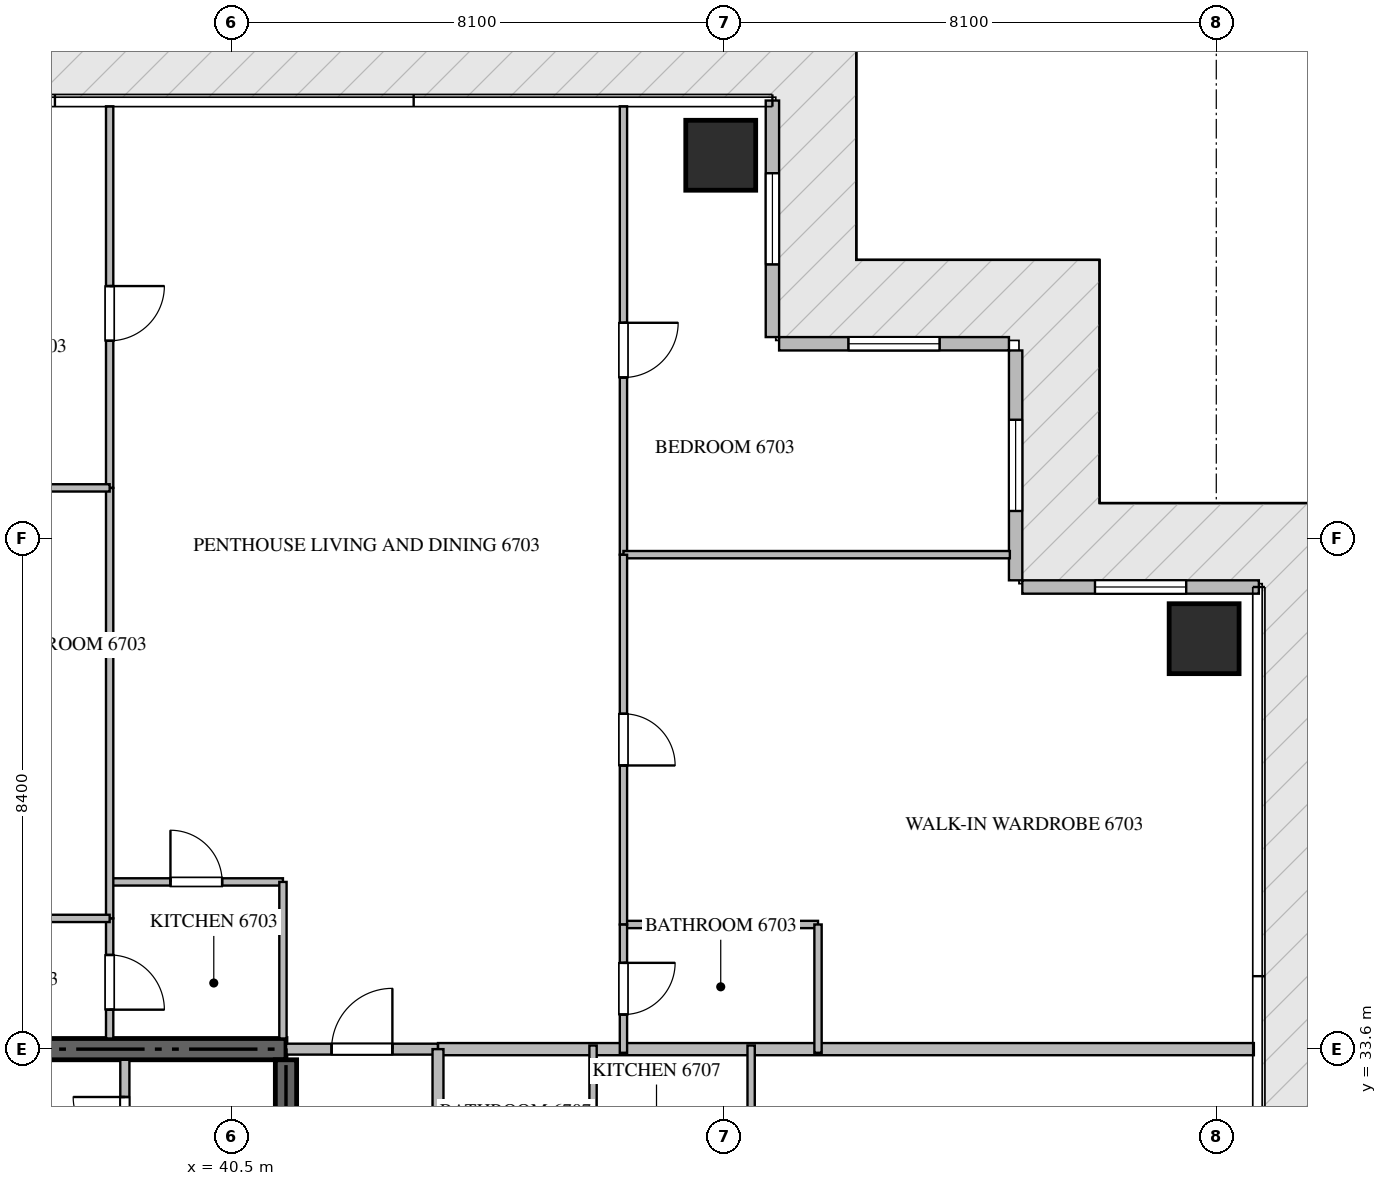
"""IFC4 building model, lengths in metres.
Left out: names, types, materials, properties, quantities, classifications, styles, units other than length and angle.
Written with IfcOpenShell. Run it as: python <this file> out.ifc"""

import sys

from ifc_helpers import new_model, si_unit, direction, frame, frame_2d, origin, origin_2d, place, context, subcontext, project, spatial, rectangle, extrude, source, transform, mapped, element, fill, save


model = new_model("IFC4")
c1 = context("Model", 3, precision=1e-05, world=origin(), true_north=direction((0.0, 1.0)))
c2 = subcontext(c1, "Body", "Model", "MODEL_VIEW")
j1 = project(units=[si_unit("LENGTHUNIT", "METRE"), si_unit("PLANEANGLEUNIT", "RADIAN")], contexts=[c1])
p1 = place(None, origin())
s1 = spatial("IfcSite", under=j1, at=p1, CompositionType="ELEMENT")
p2 = place(p1, origin())
s2 = spatial("IfcBuilding", under=s1, at=p2, CompositionType="ELEMENT")
p3 = place(p2, frame((0.0, 0.0, 268.2)))
s3 = spatial("IfcBuildingStorey", under=s2, at=p3, CompositionType="ELEMENT", Elevation=268.2)
p4 = place(p3, frame((41.4, 33.6, -0.26), z_axis=(0.0, 0.0, 1.0), x_axis=(-1.0, 0.0, 0.0)))
e1 = element("IfcWall", 1, at=p4, inside=s3, PredefinedType="SHEAR", context=c2, shape_type="SweptSolid", body=[
    extrude(rectangle(XDim=18.0, YDim=0.35, at=frame_2d((9.0, 0.0))), origin(), (0.0, 0.0, 1.0), 3.848),
])
p5 = place(p3, frame((41.4, 27.75, -0.26), z_axis=(0.0, 0.0, 1.0), x_axis=(0.0, 1.0, 0.0)))
e2 = element("IfcWall", 2, at=p5, inside=s3, PredefinedType="SHEAR", context=c2, shape_type="SweptSolid", body=[
    extrude(rectangle(XDim=5.675, YDim=0.35, at=frame_2d((2.837, 0.0))), origin(), (0.0, 0.0, 1.0), 3.848),
])
m1 = source(origin(), c2, "Body", "SweptSolid", [
    extrude(rectangle(XDim=1.15, YDim=1.15, at=origin_2d()), origin(), (0.0, 0.0, 1.0), 3.85),
])
for number, where, z_axis, x_axis in (
    (3, (48.55, 48.3, -0.26), (0.0, 0.0, 1.0), (1.0, 0.0, 0.0)),
    (4, (56.5, 40.35, -0.26), (0.0, 0.0, 1.0), (1.0, 0.0, 0.0)),
):
    element("IfcColumn", number, at=place(p3, frame(where, z_axis=z_axis, x_axis=x_axis)), inside=s3, PredefinedType="COLUMN", context=c2, shape_type="MappedRepresentation", body=[
        mapped(m1, transform((0.0, 0.0, 0.0), scale=1.0)),
    ])
p6 = place(p3, frame((57.4, 41.2, 0.0), z_axis=(0.0, 0.0, 1.0), x_axis=(-1.0, 0.0, 0.0)))
e5 = element("IfcWall", 5, at=p6, inside=s3, PredefinedType="ELEMENTEDWALL", context=c2, shape_type="SweptSolid", body=[
    extrude(rectangle(XDim=3.89, YDim=0.22, at=frame_2d((1.945, 0.0))), origin(), (0.0, 0.0, 1.0), 3.575),
])
p7 = place(p6, frame((1.195, 0.0, 0.65)))
e6 = element("IfcOpeningElement", 6, at=p7, cuts=e5, PredefinedType="OPENING", context=c2, shape_type="SweptSolid", body=[
    extrude(rectangle(XDim=1.5, YDim=2.25, at=frame_2d((0.75, 1.125))), frame((0.0, 0.12, 0.0), z_axis=(0.0, -1.0, 0.0), x_axis=(1.0, 0.0, 0.0)), (0.0, 0.0, 1.0), 0.24),
])
p8 = place(p3, frame((53.4, 41.31, 0.0), z_axis=(0.0, 0.0, 1.0), x_axis=(0.0, 1.0, 0.0)))
e7 = element("IfcWall", 7, at=p8, inside=s3, PredefinedType="ELEMENTEDWALL", context=c2, shape_type="SweptSolid", body=[
    extrude(rectangle(XDim=3.78, YDim=0.22, at=frame_2d((1.89, 0.0))), origin(), (0.0, 0.0, 1.0), 3.575),
])
p9 = place(p8, frame((1.14, 0.0, 0.65)))
e8 = element("IfcOpeningElement", 8, at=p9, cuts=e7, PredefinedType="OPENING", context=c2, shape_type="SweptSolid", body=[
    extrude(rectangle(XDim=1.5, YDim=2.25, at=frame_2d((0.75, 1.125))), frame((0.0, 0.12, 0.0), z_axis=(0.0, -1.0, 0.0), x_axis=(1.0, 0.0, 0.0)), (0.0, 0.0, 1.0), 0.24),
])
p10 = place(p3, frame((53.29, 45.2, 0.0), z_axis=(0.0, 0.0, 1.0), x_axis=(-1.0, 0.0, 0.0)))
e9 = element("IfcWall", 9, at=p10, inside=s3, PredefinedType="ELEMENTEDWALL", context=c2, shape_type="SweptSolid", body=[
    extrude(rectangle(XDim=3.78, YDim=0.22, at=frame_2d((1.89, 0.0))), origin(), (0.0, 0.0, 1.0), 3.575),
])
p11 = place(p10, frame((1.14, 0.0, 0.65)))
e10 = element("IfcOpeningElement", 10, at=p11, cuts=e9, PredefinedType="OPENING", context=c2, shape_type="SweptSolid", body=[
    extrude(rectangle(XDim=1.5, YDim=2.25, at=frame_2d((0.75, 1.125))), frame((0.0, 0.12, 0.0), z_axis=(0.0, -1.0, 0.0), x_axis=(1.0, 0.0, 0.0)), (0.0, 0.0, 1.0), 0.24),
])
p12 = place(p3, frame((49.4, 45.31, 0.0), z_axis=(0.0, 0.0, 1.0), x_axis=(0.0, 1.0, 0.0)))
e11 = element("IfcWall", 11, at=p12, inside=s3, PredefinedType="ELEMENTEDWALL", context=c2, shape_type="SweptSolid", body=[
    extrude(rectangle(XDim=3.89, YDim=0.22, at=frame_2d((1.945, 0.0))), origin(), (0.0, 0.0, 1.0), 3.575),
])
p13 = place(p12, frame((1.195, 0.0, 0.65)))
e12 = element("IfcOpeningElement", 12, at=p13, cuts=e11, PredefinedType="OPENING", context=c2, shape_type="SweptSolid", body=[
    extrude(rectangle(XDim=1.5, YDim=2.25, at=frame_2d((0.75, 1.125))), frame((0.0, 0.12, 0.0), z_axis=(0.0, -1.0, 0.0), x_axis=(1.0, 0.0, 0.0)), (0.0, 0.0, 1.0), 0.24),
])
p14 = place(p3, frame((38.75, 31.352, 0.0), z_axis=(0.0, 0.0, 1.0), x_axis=(0.0, 1.0, 0.0)))
e13 = element("IfcWall", 13, at=p14, inside=s3, PredefinedType="PARTITIONING", context=c2, shape_type="SweptSolid", body=[
    extrude(rectangle(XDim=2.073, YDim=0.15, at=frame_2d((1.037, 0.0))), origin(), (0.0, 0.0, 1.0), 3.59),
])
p15 = place(p14, frame((0.611, 0.0, 0.0)))
e14 = element("IfcOpeningElement", 14, at=p15, cuts=e13, PredefinedType="OPENING", context=c2, shape_type="SweptSolid", body=[
    extrude(rectangle(XDim=0.85, YDim=2.1, at=frame_2d((0.425, 1.05))), frame((0.0, 0.085, 0.0), z_axis=(0.0, -1.0, 0.0), x_axis=(1.0, 0.0, 0.0)), (0.0, 0.0, 1.0), 0.17),
])
p16 = place(p3, frame((43.9, 33.6, 0.0), z_axis=(0.0, 0.0, 1.0), x_axis=(1.0, 0.0, 0.0)))
e15 = element("IfcWall", 15, at=p16, inside=s3, PredefinedType="PARTITIONING", context=c2, shape_type="SweptSolid", body=[
    extrude(rectangle(XDim=13.418, YDim=0.2, at=frame_2d((6.709, 0.0))), origin(), (0.0, 0.0, 1.0), 3.59),
])
p17 = place(p3, frame((41.402, 33.6, 0.0), z_axis=(0.0, 0.0, 1.0), x_axis=(1.0, 0.0, 0.0)))
e16 = element("IfcWall", 16, at=p17, inside=s3, PredefinedType="PARTITIONING", context=c2, shape_type="SweptSolid", body=[
    extrude(rectangle(XDim=2.496, YDim=0.18, at=frame_2d((1.248, 0.0))), origin(), (0.0, 0.0, 1.0), 3.59),
])
p18 = place(p17, frame((0.748, 0.0, 0.0)))
e17 = element("IfcOpeningElement", 17, at=p18, cuts=e16, PredefinedType="OPENING", context=c2, shape_type="SweptSolid", body=[
    extrude(rectangle(XDim=1.0, YDim=2.15, at=frame_2d((0.5, 1.075))), frame((0.0, 0.1, 0.0), z_axis=(0.0, -1.0, 0.0), x_axis=(1.0, 0.0, 0.0)), (0.0, 0.0, 1.0), 0.2),
])
p19 = place(p3, frame((43.9, 16.8, 0.0), z_axis=(0.0, 0.0, 1.0), x_axis=(0.0, 1.0, 0.0)))
e18 = element("IfcWall", 18, at=p19, inside=s3, PredefinedType="PARTITIONING", context=c2, shape_type="SweptSolid", body=[
    extrude(rectangle(XDim=16.8, YDim=0.18, at=frame_2d((8.4, 0.0))), origin(), (0.0, 0.0, 1.0), 3.59),
])
p20 = place(p19, frame((2.67, 0.0, 0.0)))
e19 = element("IfcOpeningElement", 19, at=p20, cuts=e18, PredefinedType="OPENING", context=c2, shape_type="SweptSolid", body=[
    extrude(rectangle(XDim=1.0, YDim=2.15, at=frame_2d((0.5, 1.075))), frame((0.0, 0.1, 0.0), z_axis=(0.0, -1.0, 0.0), x_axis=(1.0, 0.0, 0.0)), (0.0, 0.0, 1.0), 0.2),
])
p21 = place(p19, frame((11.107, 0.0, 0.0)))
e20 = element("IfcOpeningElement", 20, at=p21, cuts=e18, PredefinedType="OPENING", context=c2, shape_type="SweptSolid", body=[
    extrude(rectangle(XDim=1.0, YDim=2.15, at=frame_2d((0.5, 1.075))), frame((0.0, 0.1, 0.0), z_axis=(0.0, -1.0, 0.0), x_axis=(1.0, 0.0, 0.0)), (0.0, 0.0, 1.0), 0.2),
])
p22 = place(p3, frame((38.5, 36.35, 0.0), z_axis=(0.0, 0.0, 1.0), x_axis=(1.0, 0.0, 0.0)))
e21 = element("IfcWall", 21, at=p22, inside=s3, PredefinedType="PARTITIONING", context=c2, shape_type="SweptSolid", body=[
    extrude(rectangle(XDim=2.85, YDim=0.12, at=frame_2d((1.425, 0.0))), origin(), (0.0, 0.0, 1.0), 3.59),
])
p23 = place(p22, frame((1.0, 0.0, 0.0)))
e22 = element("IfcOpeningElement", 22, at=p23, cuts=e21, PredefinedType="OPENING", context=c2, shape_type="SweptSolid", body=[
    extrude(rectangle(XDim=0.85, YDim=2.1, at=frame_2d((0.425, 1.05))), frame((0.0, 0.07, 0.0), z_axis=(0.0, -1.0, 0.0), x_axis=(1.0, 0.0, 0.0)), (0.0, 0.0, 1.0), 0.14),
])
p24 = place(p3, frame((41.35, 36.35, 0.0), z_axis=(0.0, 0.0, 1.0), x_axis=(0.0, -1.0, 0.0)))
e23 = element("IfcWall", 23, at=p24, inside=s3, PredefinedType="PARTITIONING", context=c2, shape_type="SweptSolid", body=[
    extrude(rectangle(XDim=2.575, YDim=0.12, at=frame_2d((1.288, 0.0))), origin(), (0.0, 0.0, 1.0), 3.59),
])
p25 = place(p3, frame((38.5, 35.75, 0.0), z_axis=(0.0, 0.0, 1.0), x_axis=(0.0, -1.0, 0.0)))
e24 = element("IfcWall", 24, at=p25, inside=s3, PredefinedType="PARTITIONING", context=c2, shape_type="SweptSolid", body=[
    extrude(rectangle(XDim=1.975, YDim=0.12, at=frame_2d((0.988, 0.0))), origin(), (0.0, 0.0, 1.0), 3.59),
])
p26 = place(p25, frame((0.601, 0.0, 0.0)))
e25 = element("IfcOpeningElement", 25, at=p26, cuts=e24, PredefinedType="OPENING", context=c2, shape_type="SweptSolid", body=[
    extrude(rectangle(XDim=0.9, YDim=2.1, at=frame_2d((0.45, 1.05))), frame((0.0, 0.07, 0.0), z_axis=(0.0, -1.0, 0.0), x_axis=(1.0, 0.0, 0.0)), (0.0, 0.0, 1.0), 0.14),
])
p27 = place(p3, frame((38.5, 49.105, 0.0), z_axis=(0.0, 0.0, 1.0), x_axis=(0.0, -1.0, 0.0)))
e26 = element("IfcWall", 26, at=p27, inside=s3, PredefinedType="PARTITIONING", context=c2, shape_type="SweptSolid", body=[
    extrude(rectangle(XDim=6.275, YDim=0.12, at=frame_2d((3.137, 0.0))), origin(), (0.0, 0.0, 1.0), 3.59),
])
p28 = place(p27, frame((2.956, 0.0, 0.0)))
e27 = element("IfcOpeningElement", 27, at=p28, cuts=e26, PredefinedType="OPENING", context=c2, shape_type="SweptSolid", body=[
    extrude(rectangle(XDim=0.9, YDim=2.1, at=frame_2d((0.45, 1.05))), frame((0.0, 0.07, 0.0), z_axis=(0.0, -1.0, 0.0), x_axis=(1.0, 0.0, 0.0)), (0.0, 0.0, 1.0), 0.14),
])
p29 = place(p3, frame((38.5, 42.828, 0.0), z_axis=(0.0, 0.0, 1.0), x_axis=(0.0, -1.0, 0.0)))
e28 = element("IfcWall", 28, at=p29, inside=s3, PredefinedType="PARTITIONING", context=c2, shape_type="SweptSolid", body=[
    extrude(rectangle(XDim=7.076, YDim=0.12, at=frame_2d((3.538, 0.0))), origin(), (0.0, 0.0, 1.0), 3.59),
])
p30 = place(p3, frame((33.35, 42.83, 0.0), z_axis=(0.0, 0.0, 1.0), x_axis=(1.0, 0.0, 0.0)))
e29 = element("IfcWall", 29, at=p30, inside=s3, PredefinedType="PARTITIONING", context=c2, shape_type="SweptSolid", body=[
    extrude(rectangle(XDim=5.15, YDim=0.12, at=frame_2d((2.575, 0.0))), origin(), (0.0, 0.0, 1.0), 3.59),
])
p31 = place(p3, frame((35.452, 35.75, 0.0), z_axis=(0.0, 0.0, 1.0), x_axis=(1.0, 0.0, 0.0)))
e30 = element("IfcWall", 30, at=p31, inside=s3, PredefinedType="PARTITIONING", context=c2, shape_type="SweptSolid", body=[
    extrude(rectangle(XDim=3.048, YDim=0.12, at=frame_2d((1.524, 0.0))), origin(), (0.0, 0.0, 1.0), 3.59),
])
p32 = place(p31, frame((1.099, 0.0, 0.0)))
e31 = element("IfcOpeningElement", 31, at=p32, cuts=e30, PredefinedType="OPENING", context=c2, shape_type="SweptSolid", body=[
    extrude(rectangle(XDim=0.85, YDim=2.1, at=frame_2d((0.425, 1.05))), frame((0.0, 0.07, 0.0), z_axis=(0.0, -1.0, 0.0), x_axis=(1.0, 0.0, 0.0)), (0.0, 0.0, 1.0), 0.14),
])
p33 = place(p3, frame((46.95, 49.105, 0.0), z_axis=(0.0, 0.0, 1.0), x_axis=(0.0, -1.0, 0.0)))
e32 = element("IfcWall", 32, at=p33, inside=s3, PredefinedType="PARTITIONING", context=c2, shape_type="SweptSolid", body=[
    extrude(rectangle(XDim=7.373, YDim=0.12, at=frame_2d((3.687, 0.0))), origin(), (0.0, 0.0, 1.0), 3.59),
])
p34 = place(p33, frame((3.56, 0.0, 0.0)))
e33 = element("IfcOpeningElement", 33, at=p34, cuts=e32, PredefinedType="OPENING", context=c2, shape_type="SweptSolid", body=[
    extrude(rectangle(XDim=0.9, YDim=2.1, at=frame_2d((0.45, 1.05))), frame((0.0, 0.07, 0.0), z_axis=(0.0, -1.0, 0.0), x_axis=(1.0, 0.0, 0.0)), (0.0, 0.0, 1.0), 0.14),
])
p35 = place(p3, frame((46.95, 41.732, 0.0), z_axis=(0.0, 0.0, 1.0), x_axis=(1.0, 0.0, 0.0)))
e34 = element("IfcWall", 34, at=p35, inside=s3, PredefinedType="PARTITIONING", context=c2, shape_type="SweptSolid", body=[
    extrude(rectangle(XDim=6.355, YDim=0.12, at=frame_2d((3.177, 0.0))), origin(), (0.0, 0.0, 1.0), 3.59),
])
p36 = place(p3, frame((46.95, 35.65, 0.0), z_axis=(0.0, 0.0, 1.0), x_axis=(1.0, 0.0, 0.0)))
e35 = element("IfcWall", 35, at=p36, inside=s3, PredefinedType="PARTITIONING", context=c2, shape_type="SweptSolid", body=[
    extrude(rectangle(XDim=3.2, YDim=0.12, at=frame_2d((1.6, 0.0))), origin(), (0.0, 0.0, 1.0), 3.59),
])
p37 = place(p3, frame((50.15, 35.65, 0.0), z_axis=(0.0, 0.0, 1.0), x_axis=(0.0, -1.0, 0.0)))
e36 = element("IfcWall", 36, at=p37, inside=s3, PredefinedType="PARTITIONING", context=c2, shape_type="SweptSolid", body=[
    extrude(rectangle(XDim=2.11, YDim=0.12, at=frame_2d((1.055, 0.0))), origin(), (0.0, 0.0, 1.0), 3.59),
])
p38 = place(p3, frame((46.95, 41.73, 0.0), z_axis=(0.0, 0.0, 1.0), x_axis=(0.0, -1.0, 0.0)))
e37 = element("IfcWall", 37, at=p38, inside=s3, PredefinedType="PARTITIONING", context=c2, shape_type="SweptSolid", body=[
    extrude(rectangle(XDim=6.08, YDim=0.12, at=frame_2d((3.04, 0.0))), origin(), (0.0, 0.0, 1.0), 3.59),
])
p39 = place(p38, frame((2.615, 0.0, 0.0)))
e38 = element("IfcOpeningElement", 38, at=p39, cuts=e37, PredefinedType="OPENING", context=c2, shape_type="SweptSolid", body=[
    extrude(rectangle(XDim=0.85, YDim=2.1, at=frame_2d((0.425, 1.05))), frame((0.0, 0.07, 0.0), z_axis=(0.0, -1.0, 0.0), x_axis=(1.0, 0.0, 0.0)), (0.0, 0.0, 1.0), 0.14),
])
p40 = place(p3, frame((46.95, 35.648, 0.0), z_axis=(0.0, 0.0, 1.0), x_axis=(0.0, -1.0, 0.0)))
e39 = element("IfcWall", 39, at=p40, inside=s3, PredefinedType="PARTITIONING", context=c2, shape_type="SweptSolid", body=[
    extrude(rectangle(XDim=2.108, YDim=0.12, at=frame_2d((1.054, 0.0))), origin(), (0.0, 0.0, 1.0), 3.59),
])
p41 = place(p40, frame((0.629, 0.0, 0.0)))
e40 = element("IfcOpeningElement", 40, at=p41, cuts=e39, PredefinedType="OPENING", context=c2, shape_type="SweptSolid", body=[
    extrude(rectangle(XDim=0.85, YDim=2.1, at=frame_2d((0.425, 1.05))), frame((0.0, 0.07, 0.0), z_axis=(0.0, -1.0, 0.0), x_axis=(1.0, 0.0, 0.0)), (0.0, 0.0, 1.0), 0.14),
])
for number, where, z_axis, x_axis in (
    (41, (46.45, 31.0, 0.0), (0.0, 0.0, 1.0), (0.0, 1.0, 0.0)),
    (42, (49.05, 31.0, 0.0), (0.0, 0.0, 1.0), (0.0, 1.0, 0.0)),
):
    element("IfcWall", number, at=place(p3, frame(where, z_axis=z_axis, x_axis=x_axis)), inside=s3, PredefinedType="PARTITIONING", context=c2, shape_type="SweptSolid", body=[
        extrude(rectangle(XDim=2.66, YDim=0.12, at=frame_2d((1.33, 0.0))), origin(), (0.0, 0.0, 1.0), 3.59),
    ])
m2 = source(origin(), c2, "Body", "SweptSolid", [
    extrude(rectangle(XDim=1.5, YDim=2.25, at=frame_2d((0.75, 1.125))), frame((0.0, 0.03, 0.0), z_axis=(0.0, -1.0, 0.0), x_axis=(1.0, 0.0, 0.0)), (0.0, 0.0, 1.0), 0.06),
])
p42 = place(p7, origin())
e43 = element("IfcWindow", 43, at=p42, inside=s3, PartitioningType="SINGLE_PANEL", PredefinedType="WINDOW", context=c2, shape_type="MappedRepresentation", body=[
    mapped(m2, transform((0.0, 0.0, 0.0), scale=1.0)),
])
fill(e6, e43)
p43 = place(p9, origin())
e44 = element("IfcWindow", 44, at=p43, inside=s3, PartitioningType="SINGLE_PANEL", PredefinedType="WINDOW", context=c2, shape_type="MappedRepresentation", body=[
    mapped(m2, transform((0.0, 0.0, 0.0), scale=1.0)),
])
fill(e8, e44)
p44 = place(p11, origin())
e45 = element("IfcWindow", 45, at=p44, inside=s3, PartitioningType="SINGLE_PANEL", PredefinedType="WINDOW", context=c2, shape_type="MappedRepresentation", body=[
    mapped(m2, transform((0.0, 0.0, 0.0), scale=1.0)),
])
fill(e10, e45)
p45 = place(p13, origin())
e46 = element("IfcWindow", 46, at=p45, inside=s3, PartitioningType="SINGLE_PANEL", PredefinedType="WINDOW", context=c2, shape_type="MappedRepresentation", body=[
    mapped(m2, transform((0.0, 0.0, 0.0), scale=1.0)),
])
fill(e12, e46)
m3 = source(origin(), c2, "Body", "SweptSolid", [
    extrude(rectangle(XDim=0.85, YDim=2.1, at=frame_2d((0.425, 1.05))), frame((0.0, 0.025, 0.0), z_axis=(0.0, -1.0, 0.0), x_axis=(1.0, 0.0, 0.0)), (0.0, 0.0, 1.0), 0.05),
])
p46 = place(p15, origin())
e47 = element("IfcDoor", 47, at=p46, inside=s3, OperationType="SINGLE_SWING_RIGHT", PredefinedType="DOOR", context=c2, shape_type="MappedRepresentation", body=[
    mapped(m3, transform((0.0, 0.0, 0.0), scale=1.0)),
])
fill(e14, e47)
m4 = source(origin(), c2, "Body", "SweptSolid", [
    extrude(rectangle(XDim=1.0, YDim=2.15, at=frame_2d((0.5, 1.075))), frame((0.0, 0.025, 0.0), z_axis=(0.0, -1.0, 0.0), x_axis=(1.0, 0.0, 0.0)), (0.0, 0.0, 1.0), 0.05),
])
p47 = place(p18, origin())
e48 = element("IfcDoor", 48, at=p47, inside=s3, OperationType="SINGLE_SWING_RIGHT", PredefinedType="DOOR", context=c2, shape_type="MappedRepresentation", body=[
    mapped(m4, transform((0.0, 0.0, 0.0), scale=1.0)),
])
fill(e17, e48)
p48 = place(p23, origin())
e49 = element("IfcDoor", 49, at=p48, inside=s3, OperationType="SINGLE_SWING_LEFT", PredefinedType="DOOR", context=c2, shape_type="MappedRepresentation", body=[
    mapped(m3, transform((0.0, 0.0, 0.0), scale=1.0)),
])
fill(e22, e49)
m5 = source(origin(), c2, "Body", "SweptSolid", [
    extrude(rectangle(XDim=0.9, YDim=2.1, at=frame_2d((0.45, 1.05))), frame((0.0, 0.025, 0.0), z_axis=(0.0, -1.0, 0.0), x_axis=(1.0, 0.0, 0.0)), (0.0, 0.0, 1.0), 0.05),
])
p49 = place(p26, origin())
e50 = element("IfcDoor", 50, at=p49, inside=s3, OperationType="SINGLE_SWING_RIGHT", PredefinedType="DOOR", context=c2, shape_type="MappedRepresentation", body=[
    mapped(m5, transform((0.0, 0.0, 0.0), scale=1.0)),
])
fill(e25, e50)
p50 = place(p28, origin())
e51 = element("IfcDoor", 51, at=p50, inside=s3, OperationType="SINGLE_SWING_LEFT", PredefinedType="DOOR", context=c2, shape_type="MappedRepresentation", body=[
    mapped(m5, transform((0.0, 0.0, 0.0), scale=1.0)),
])
fill(e27, e51)
p51 = place(p34, origin())
e52 = element("IfcDoor", 52, at=p51, inside=s3, OperationType="SINGLE_SWING_LEFT", PredefinedType="DOOR", context=c2, shape_type="MappedRepresentation", body=[
    mapped(m5, transform((0.0, 0.0, 0.0), scale=1.0)),
])
fill(e33, e52)
p52 = place(p39, origin())
e53 = element("IfcDoor", 53, at=p52, inside=s3, OperationType="SINGLE_SWING_RIGHT", PredefinedType="DOOR", context=c2, shape_type="MappedRepresentation", body=[
    mapped(m3, transform((0.0, 0.0, 0.0), scale=1.0)),
])
fill(e38, e53)
p53 = place(p41, origin())
e54 = element("IfcDoor", 54, at=p53, inside=s3, OperationType="SINGLE_SWING_LEFT", PredefinedType="DOOR", context=c2, shape_type="MappedRepresentation", body=[
    mapped(m3, transform((0.0, 0.0, 0.0), scale=1.0)),
])
fill(e40, e54)
save(model, sys.argv[1])
